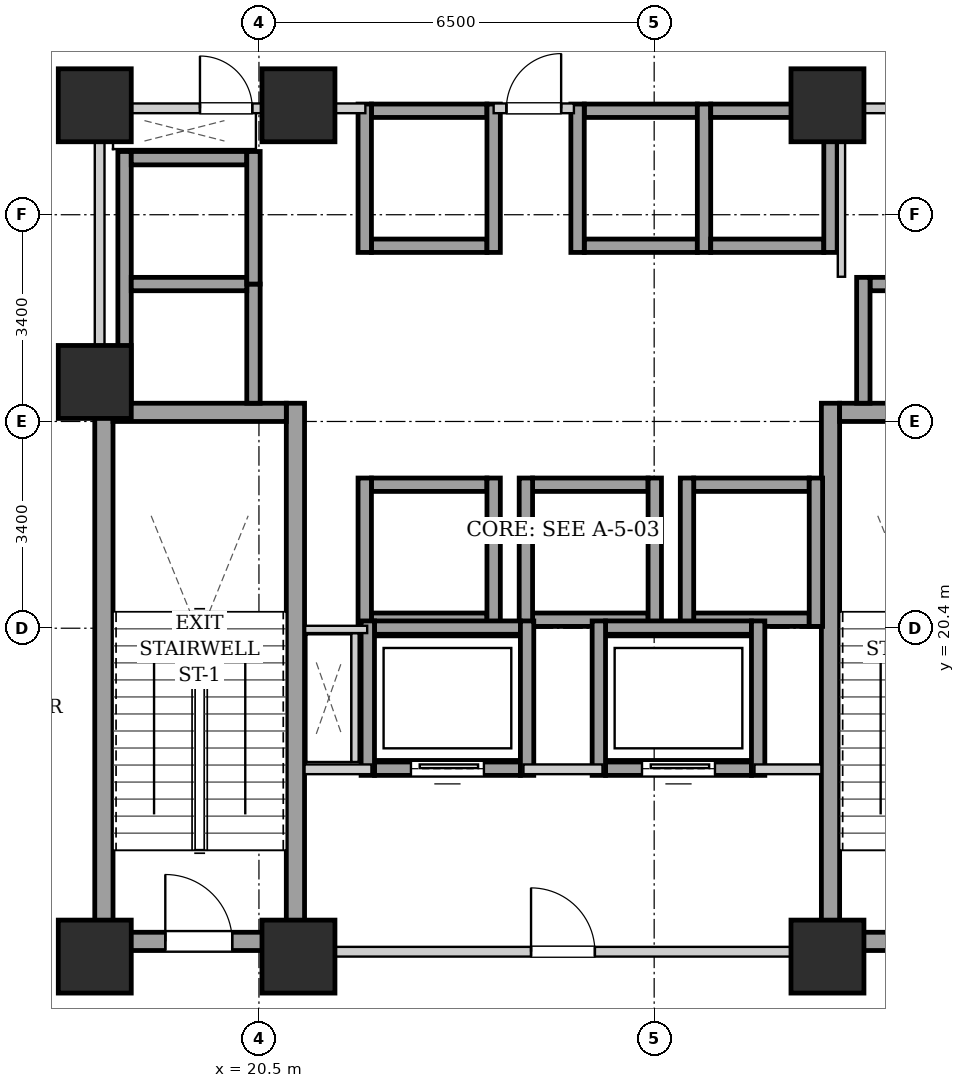
"""IFC4 building model, lengths in metres.
Left out: names, types, materials, properties, quantities, classifications, styles, units other than length and angle.
Written with IfcOpenShell. Run it as: python <this file> out.ifc"""

import sys

from ifc_helpers import new_model, si_unit, direction, frame, frame_2d, origin, origin_2d, place, context, subcontext, project, spatial, rectangle, extrude, element, fill, save


model = new_model("IFC4")
c1 = context("Model", 3, precision=1e-05, world=origin(), true_north=direction((0.0, 1.0)))
c2 = subcontext(c1, "Body", "Model", "MODEL_VIEW")
j1 = project(units=[si_unit("LENGTHUNIT", "METRE"), si_unit("PLANEANGLEUNIT", "RADIAN")], contexts=[c1])
p1 = place(None, origin())
s1 = spatial("IfcSite", under=j1, at=p1, CompositionType="ELEMENT")
p2 = place(p1, origin())
s2 = spatial("IfcBuilding", under=s1, at=p2, CompositionType="ELEMENT")
p3 = place(p2, frame((0.0, 0.0, 6.0)))
s3 = spatial("IfcBuildingStorey", under=s2, at=p3, CompositionType="ELEMENT", Elevation=6.0)
for number, where, z_axis, x_axis in (
    (1, (17.8, 15.0, 0.0), (0.0, 0.0, 1.0), (1.0, 0.0, 0.0)),
    (2, (21.15, 15.0, 0.0), (0.0, 0.0, 1.0), (1.0, 0.0, 0.0)),
    (3, (29.85, 15.0, 0.0), (0.0, 0.0, 1.0), (1.0, 0.0, 0.0)),
    (4, (17.8, 29.0, 0.0), (0.0, 0.0, 1.0), (1.0, 0.0, 0.0)),
    (5, (21.15, 29.0, 0.0), (0.0, 0.0, 1.0), (1.0, 0.0, 0.0)),
    (6, (29.85, 29.0, 0.0), (0.0, 0.0, 1.0), (1.0, 0.0, 0.0)),
    (7, (17.8, 24.45, 0.0), (0.0, 0.0, 1.0), (1.0, 0.0, 0.0)),
):
    element("IfcColumn", number, at=place(p3, frame(where, z_axis=z_axis, x_axis=x_axis)), inside=s3, PredefinedType="COLUMN", context=c2, shape_type="SweptSolid", body=[
        extrude(rectangle(XDim=1.2, YDim=1.2, at=origin_2d()), origin(), (0.0, 0.0, 1.0), 5.2),
    ])
for number, where, z_axis, x_axis in (
    (8, (17.95, 15.1, 0.0), (0.0, 0.0, 1.0), (0.0, 1.0, 0.0)),
    (9, (21.1, 15.1, 0.0), (0.0, 0.0, 1.0), (0.0, 1.0, 0.0)),
):
    element("IfcWall", number, at=place(p3, frame(where, z_axis=z_axis, x_axis=x_axis)), inside=s3, PredefinedType="SHEAR", context=c2, shape_type="SweptSolid", body=[
        extrude(rectangle(XDim=9.0, YDim=0.3, at=frame_2d((4.5, 0.0))), origin(), (0.0, 0.0, 1.0), 4.88),
    ])
p4 = place(p3, frame((18.1, 23.95, 0.0), z_axis=(0.0, 0.0, 1.0), x_axis=(1.0, 0.0, 0.0)))
e10 = element("IfcWall", 10, at=p4, inside=s3, PredefinedType="SHEAR", context=c2, shape_type="SweptSolid", body=[
    extrude(rectangle(XDim=2.85, YDim=0.3, at=frame_2d((1.425, 0.0))), origin(), (0.0, 0.0, 1.0), 4.88),
])
p5 = place(p3, frame((18.1, 15.25, 0.0), z_axis=(0.0, 0.0, 1.0), x_axis=(1.0, 0.0, 0.0)))
e11 = element("IfcWall", 11, at=p5, inside=s3, PredefinedType="SHEAR", context=c2, shape_type="SweptSolid", body=[
    extrude(rectangle(XDim=2.85, YDim=0.3, at=frame_2d((1.425, 0.0))), origin(), (0.0, 0.0, 1.0), 4.88),
])
p6 = place(p5, frame((0.86, 0.0, 0.0)))
e12 = element("IfcOpeningElement", 12, at=p6, cuts=e11, PredefinedType="OPENING", context=c2, shape_type="SweptSolid", body=[
    extrude(rectangle(XDim=1.1, YDim=2.05, at=frame_2d((0.55, 1.025))), frame((0.0, 0.16, 0.0), z_axis=(0.0, -1.0, 0.0), x_axis=(1.0, 0.0, 0.0)), (0.0, 0.0, 1.0), 0.32),
])
p7 = place(p3, frame((29.9, 15.1, 0.0), z_axis=(0.0, 0.0, 1.0), x_axis=(0.0, 1.0, 0.0)))
e13 = element("IfcWall", 13, at=p7, inside=s3, PredefinedType="SHEAR", context=c2, shape_type="SweptSolid", body=[
    extrude(rectangle(XDim=9.0, YDim=0.3, at=frame_2d((4.5, 0.0))), origin(), (0.0, 0.0, 1.0), 4.88),
])
p8 = place(p3, frame((30.05, 23.95, 0.0), z_axis=(0.0, 0.0, 1.0), x_axis=(1.0, 0.0, 0.0)))
e14 = element("IfcWall", 14, at=p8, inside=s3, PredefinedType="SHEAR", context=c2, shape_type="SweptSolid", body=[
    extrude(rectangle(XDim=2.85, YDim=0.3, at=frame_2d((1.425, 0.0))), origin(), (0.0, 0.0, 1.0), 4.88),
])
p9 = place(p3, frame((30.05, 15.25, 0.0), z_axis=(0.0, 0.0, 1.0), x_axis=(1.0, 0.0, 0.0)))
e15 = element("IfcWall", 15, at=p9, inside=s3, PredefinedType="SHEAR", context=c2, shape_type="SweptSolid", body=[
    extrude(rectangle(XDim=2.85, YDim=0.3, at=frame_2d((1.425, 0.0))), origin(), (0.0, 0.0, 1.0), 4.88),
])
p10 = place(p9, frame((0.86, 0.0, 0.0)))
e16 = element("IfcOpeningElement", 16, at=p10, cuts=e15, PredefinedType="OPENING", context=c2, shape_type="SweptSolid", body=[
    extrude(rectangle(XDim=1.1, YDim=2.05, at=frame_2d((0.55, 1.025))), frame((0.0, 0.16, 0.0), z_axis=(0.0, -1.0, 0.0), x_axis=(1.0, 0.0, 0.0)), (0.0, 0.0, 1.0), 0.32),
])
for number, where, z_axis, x_axis in (
    (17, (22.35, 26.69, 0.0), (0.0, 0.0, 1.0), (1.0, 0.0, 0.0)),
    (18, (22.35, 28.91, 0.0), (0.0, 0.0, 1.0), (1.0, 0.0, 0.0)),
):
    element("IfcWall", number, at=place(p3, frame(where, z_axis=z_axis, x_axis=x_axis)), inside=s3, PredefinedType="SHEAR", context=c2, shape_type="SweptSolid", body=[
        extrude(rectangle(XDim=1.9, YDim=0.22, at=frame_2d((0.95, 0.0))), origin(), (0.0, 0.0, 1.0), 4.88),
    ])
for number, where, z_axis, x_axis in (
    (19, (22.24, 26.58, 0.0), (0.0, 0.0, 1.0), (0.0, 1.0, 0.0)),
    (20, (24.36, 26.58, 0.0), (0.0, 0.0, 1.0), (0.0, 1.0, 0.0)),
):
    element("IfcWall", number, at=place(p3, frame(where, z_axis=z_axis, x_axis=x_axis)), inside=s3, PredefinedType="SHEAR", context=c2, shape_type="SweptSolid", body=[
        extrude(rectangle(XDim=2.44, YDim=0.22, at=frame_2d((1.22, 0.0))), origin(), (0.0, 0.0, 1.0), 4.88),
    ])
for number, where, z_axis, x_axis in (
    (21, (25.85, 26.69, 0.0), (0.0, 0.0, 1.0), (1.0, 0.0, 0.0)),
    (22, (25.85, 28.91, 0.0), (0.0, 0.0, 1.0), (1.0, 0.0, 0.0)),
):
    element("IfcWall", number, at=place(p3, frame(where, z_axis=z_axis, x_axis=x_axis)), inside=s3, PredefinedType="SHEAR", context=c2, shape_type="SweptSolid", body=[
        extrude(rectangle(XDim=1.86, YDim=0.22, at=frame_2d((0.93, 0.0))), origin(), (0.0, 0.0, 1.0), 4.88),
    ])
for number, where, z_axis, x_axis in (
    (23, (25.74, 26.58, 0.0), (0.0, 0.0, 1.0), (0.0, 1.0, 0.0)),
    (24, (27.82, 26.58, 0.0), (0.0, 0.0, 1.0), (0.0, 1.0, 0.0)),
):
    element("IfcWall", number, at=place(p3, frame(where, z_axis=z_axis, x_axis=x_axis)), inside=s3, PredefinedType="SHEAR", context=c2, shape_type="SweptSolid", body=[
        extrude(rectangle(XDim=2.44, YDim=0.22, at=frame_2d((1.22, 0.0))), origin(), (0.0, 0.0, 1.0), 4.88),
    ])
for number, where, z_axis, x_axis in (
    (25, (27.93, 26.69, 0.0), (0.0, 0.0, 1.0), (1.0, 0.0, 0.0)),
    (26, (27.93, 28.91, 0.0), (0.0, 0.0, 1.0), (1.0, 0.0, 0.0)),
):
    element("IfcWall", number, at=place(p3, frame(where, z_axis=z_axis, x_axis=x_axis)), inside=s3, PredefinedType="SHEAR", context=c2, shape_type="SweptSolid", body=[
        extrude(rectangle(XDim=1.86, YDim=0.22, at=frame_2d((0.93, 0.0))), origin(), (0.0, 0.0, 1.0), 4.88),
    ])
p11 = place(p3, frame((29.9, 26.58, 0.0), z_axis=(0.0, 0.0, 1.0), x_axis=(0.0, 1.0, 0.0)))
e27 = element("IfcWall", 27, at=p11, inside=s3, PredefinedType="SHEAR", context=c2, shape_type="SweptSolid", body=[
    extrude(rectangle(XDim=2.44, YDim=0.22, at=frame_2d((1.22, 0.0))), origin(), (0.0, 0.0, 1.0), 4.88),
])
for number, where, z_axis, x_axis in (
    (28, (22.35, 20.54, 0.0), (0.0, 0.0, 1.0), (1.0, 0.0, 0.0)),
    (29, (22.35, 22.76, 0.0), (0.0, 0.0, 1.0), (1.0, 0.0, 0.0)),
):
    element("IfcWall", number, at=place(p3, frame(where, z_axis=z_axis, x_axis=x_axis)), inside=s3, PredefinedType="SHEAR", context=c2, shape_type="SweptSolid", body=[
        extrude(rectangle(XDim=1.9, YDim=0.22, at=frame_2d((0.95, 0.0))), origin(), (0.0, 0.0, 1.0), 4.88),
    ])
for number, where, z_axis, x_axis in (
    (30, (22.24, 20.43, 0.0), (0.0, 0.0, 1.0), (0.0, 1.0, 0.0)),
    (31, (24.36, 20.43, 0.0), (0.0, 0.0, 1.0), (0.0, 1.0, 0.0)),
):
    element("IfcWall", number, at=place(p3, frame(where, z_axis=z_axis, x_axis=x_axis)), inside=s3, PredefinedType="SHEAR", context=c2, shape_type="SweptSolid", body=[
        extrude(rectangle(XDim=2.44, YDim=0.22, at=frame_2d((1.22, 0.0))), origin(), (0.0, 0.0, 1.0), 4.88),
    ])
for number, where, z_axis, x_axis in (
    (32, (25.0, 20.54, 0.0), (0.0, 0.0, 1.0), (1.0, 0.0, 0.0)),
    (33, (25.0, 22.76, 0.0), (0.0, 0.0, 1.0), (1.0, 0.0, 0.0)),
):
    element("IfcWall", number, at=place(p3, frame(where, z_axis=z_axis, x_axis=x_axis)), inside=s3, PredefinedType="SHEAR", context=c2, shape_type="SweptSolid", body=[
        extrude(rectangle(XDim=1.9, YDim=0.22, at=frame_2d((0.95, 0.0))), origin(), (0.0, 0.0, 1.0), 4.88),
    ])
for number, where, z_axis, x_axis in (
    (34, (24.89, 20.43, 0.0), (0.0, 0.0, 1.0), (0.0, 1.0, 0.0)),
    (35, (27.01, 20.43, 0.0), (0.0, 0.0, 1.0), (0.0, 1.0, 0.0)),
):
    element("IfcWall", number, at=place(p3, frame(where, z_axis=z_axis, x_axis=x_axis)), inside=s3, PredefinedType="SHEAR", context=c2, shape_type="SweptSolid", body=[
        extrude(rectangle(XDim=2.44, YDim=0.22, at=frame_2d((1.22, 0.0))), origin(), (0.0, 0.0, 1.0), 4.88),
    ])
for number, where, z_axis, x_axis in (
    (36, (27.65, 20.54, 0.0), (0.0, 0.0, 1.0), (1.0, 0.0, 0.0)),
    (37, (27.65, 22.76, 0.0), (0.0, 0.0, 1.0), (1.0, 0.0, 0.0)),
):
    element("IfcWall", number, at=place(p3, frame(where, z_axis=z_axis, x_axis=x_axis)), inside=s3, PredefinedType="SHEAR", context=c2, shape_type="SweptSolid", body=[
        extrude(rectangle(XDim=1.9, YDim=0.22, at=frame_2d((0.95, 0.0))), origin(), (0.0, 0.0, 1.0), 4.88),
    ])
for number, where, z_axis, x_axis in (
    (38, (27.54, 20.43, 0.0), (0.0, 0.0, 1.0), (0.0, 1.0, 0.0)),
    (39, (29.66, 20.43, 0.0), (0.0, 0.0, 1.0), (0.0, 1.0, 0.0)),
):
    element("IfcWall", number, at=place(p3, frame(where, z_axis=z_axis, x_axis=x_axis)), inside=s3, PredefinedType="SHEAR", context=c2, shape_type="SweptSolid", body=[
        extrude(rectangle(XDim=2.44, YDim=0.22, at=frame_2d((1.22, 0.0))), origin(), (0.0, 0.0, 1.0), 4.88),
    ])
p12 = place(p3, frame((18.29, 24.1, 0.0), z_axis=(0.0, 0.0, 1.0), x_axis=(0.0, 1.0, 0.0)))
e40 = element("IfcWall", 40, at=p12, inside=s3, PredefinedType="SHEAR", context=c2, shape_type="SweptSolid", body=[
    extrude(rectangle(XDim=4.14, YDim=0.22, at=frame_2d((2.07, 0.0))), origin(), (0.0, 0.0, 1.0), 4.88),
])
p13 = place(p3, frame((20.41, 24.1, 0.0), z_axis=(0.0, 0.0, 1.0), x_axis=(0.0, 1.0, 0.0)))
e41 = element("IfcWall", 41, at=p13, inside=s3, PredefinedType="SHEAR", context=c2, shape_type="SweptSolid", body=[
    extrude(rectangle(XDim=1.96, YDim=0.22, at=frame_2d((0.98, 0.0))), origin(), (0.0, 0.0, 1.0), 4.88),
])
for number, where, z_axis, x_axis in (
    (42, (18.4, 26.06, 0.0), (0.0, 0.0, 1.0), (1.0, 0.0, 0.0)),
    (43, (18.4, 28.13, 0.0), (0.0, 0.0, 1.0), (1.0, 0.0, 0.0)),
):
    element("IfcWall", number, at=place(p3, frame(where, z_axis=z_axis, x_axis=x_axis)), inside=s3, PredefinedType="SHEAR", context=c2, shape_type="SweptSolid", body=[
        extrude(rectangle(XDim=1.9, YDim=0.22, at=frame_2d((0.95, 0.0))), origin(), (0.0, 0.0, 1.0), 4.88),
    ])
p14 = place(p3, frame((20.41, 26.06, 0.0), z_axis=(0.0, 0.0, 1.0), x_axis=(0.0, 1.0, 0.0)))
e44 = element("IfcWall", 44, at=p14, inside=s3, PredefinedType="SHEAR", context=c2, shape_type="SweptSolid", body=[
    extrude(rectangle(XDim=2.18, YDim=0.22, at=frame_2d((1.09, 0.0))), origin(), (0.0, 0.0, 1.0), 4.88),
])
p15 = place(p3, frame((30.55, 26.06, 0.0), z_axis=(0.0, 0.0, 1.0), x_axis=(1.0, 0.0, 0.0)))
e45 = element("IfcWall", 45, at=p15, inside=s3, PredefinedType="SHEAR", context=c2, shape_type="SweptSolid", body=[
    extrude(rectangle(XDim=1.9, YDim=0.22, at=frame_2d((0.95, 0.0))), origin(), (0.0, 0.0, 1.0), 4.88),
])
p16 = place(p3, frame((30.44, 24.1, 0.0), z_axis=(0.0, 0.0, 1.0), x_axis=(0.0, 1.0, 0.0)))
e46 = element("IfcWall", 46, at=p16, inside=s3, PredefinedType="SHEAR", context=c2, shape_type="SweptSolid", body=[
    extrude(rectangle(XDim=2.07, YDim=0.22, at=frame_2d((1.035, 0.0))), origin(), (0.0, 0.0, 1.0), 4.88),
])
p17 = place(p3, frame((22.4, 18.09, 0.0), z_axis=(0.0, 0.0, 1.0), x_axis=(1.0, 0.0, 0.0)))
e47 = element("IfcWall", 47, at=p17, inside=s3, PredefinedType="SHEAR", context=c2, shape_type="SweptSolid", body=[
    extrude(rectangle(XDim=2.4, YDim=0.22, at=frame_2d((1.2, 0.0))), origin(), (0.0, 0.0, 1.0), 4.88),
])
p18 = place(p17, frame((0.6, 0.0, 0.0)))
e48 = element("IfcOpeningElement", 48, at=p18, cuts=e47, PredefinedType="OPENING", context=c2, shape_type="SweptSolid", body=[
    extrude(rectangle(XDim=1.2, YDim=2.15, at=frame_2d((0.6, 1.075))), frame((0.0, 0.12, 0.0), z_axis=(0.0, -1.0, 0.0), x_axis=(1.0, 0.0, 0.0)), (0.0, 0.0, 1.0), 0.24),
])
p19 = place(p3, frame((22.4, 20.41, 0.0), z_axis=(0.0, 0.0, 1.0), x_axis=(1.0, 0.0, 0.0)))
e49 = element("IfcWall", 49, at=p19, inside=s3, PredefinedType="SHEAR", context=c2, shape_type="SweptSolid", body=[
    extrude(rectangle(XDim=2.4, YDim=0.22, at=frame_2d((1.2, 0.0))), origin(), (0.0, 0.0, 1.0), 4.88),
])
for number, where, z_axis, x_axis in (
    (50, (22.29, 17.98, 0.0), (0.0, 0.0, 1.0), (0.0, 1.0, 0.0)),
    (51, (24.91, 17.98, 0.0), (0.0, 0.0, 1.0), (0.0, 1.0, 0.0)),
):
    element("IfcWall", number, at=place(p3, frame(where, z_axis=z_axis, x_axis=x_axis)), inside=s3, PredefinedType="SHEAR", context=c2, shape_type="SweptSolid", body=[
        extrude(rectangle(XDim=2.54, YDim=0.22, at=frame_2d((1.27, 0.0))), origin(), (0.0, 0.0, 1.0), 4.88),
    ])
p20 = place(p3, frame((26.2, 18.09, 0.0), z_axis=(0.0, 0.0, 1.0), x_axis=(1.0, 0.0, 0.0)))
e52 = element("IfcWall", 52, at=p20, inside=s3, PredefinedType="SHEAR", context=c2, shape_type="SweptSolid", body=[
    extrude(rectangle(XDim=2.4, YDim=0.22, at=frame_2d((1.2, 0.0))), origin(), (0.0, 0.0, 1.0), 4.88),
])
p21 = place(p20, frame((0.6, 0.0, 0.0)))
e53 = element("IfcOpeningElement", 53, at=p21, cuts=e52, PredefinedType="OPENING", context=c2, shape_type="SweptSolid", body=[
    extrude(rectangle(XDim=1.2, YDim=2.15, at=frame_2d((0.6, 1.075))), frame((0.0, 0.12, 0.0), z_axis=(0.0, -1.0, 0.0), x_axis=(1.0, 0.0, 0.0)), (0.0, 0.0, 1.0), 0.24),
])
p22 = place(p3, frame((26.2, 20.41, 0.0), z_axis=(0.0, 0.0, 1.0), x_axis=(1.0, 0.0, 0.0)))
e54 = element("IfcWall", 54, at=p22, inside=s3, PredefinedType="SHEAR", context=c2, shape_type="SweptSolid", body=[
    extrude(rectangle(XDim=2.4, YDim=0.22, at=frame_2d((1.2, 0.0))), origin(), (0.0, 0.0, 1.0), 4.88),
])
for number, where, z_axis, x_axis in (
    (55, (26.09, 17.98, 0.0), (0.0, 0.0, 1.0), (0.0, 1.0, 0.0)),
    (56, (28.71, 17.98, 0.0), (0.0, 0.0, 1.0), (0.0, 1.0, 0.0)),
):
    element("IfcWall", number, at=place(p3, frame(where, z_axis=z_axis, x_axis=x_axis)), inside=s3, PredefinedType="SHEAR", context=c2, shape_type="SweptSolid", body=[
        extrude(rectangle(XDim=2.54, YDim=0.22, at=frame_2d((1.27, 0.0))), origin(), (0.0, 0.0, 1.0), 4.88),
    ])
p23 = place(p3, frame((21.25, 15.08, 0.0), z_axis=(0.0, 0.0, 1.0), x_axis=(1.0, 0.0, 0.0)))
e57 = element("IfcWall", 57, at=p23, inside=s3, PredefinedType="PARTITIONING", context=c2, shape_type="SweptSolid", body=[
    extrude(rectangle(XDim=8.5, YDim=0.16, at=frame_2d((4.25, 0.0))), origin(), (0.0, 0.0, 1.0), 4.88),
])
p24 = place(p23, frame((3.725, 0.0, 0.0)))
e58 = element("IfcOpeningElement", 58, at=p24, cuts=e57, PredefinedType="OPENING", context=c2, shape_type="SweptSolid", body=[
    extrude(rectangle(XDim=1.05, YDim=2.05, at=frame_2d((0.525, 1.025))), frame((0.0, 0.09, 0.0), z_axis=(0.0, -1.0, 0.0), x_axis=(1.0, 0.0, 0.0)), (0.0, 0.0, 1.0), 0.18),
])
p25 = place(p3, frame((21.25, 18.08, 0.0), z_axis=(0.0, 0.0, 1.0), x_axis=(1.0, 0.0, 0.0)))
e59 = element("IfcWall", 59, at=p25, inside=s3, PredefinedType="PARTITIONING", context=c2, shape_type="SweptSolid", body=[
    extrude(rectangle(XDim=1.1, YDim=0.16, at=frame_2d((0.55, 0.0))), origin(), (0.0, 0.0, 1.0), 4.88),
])
p26 = place(p3, frame((24.85, 18.08, 0.0), z_axis=(0.0, 0.0, 1.0), x_axis=(1.0, 0.0, 0.0)))
e60 = element("IfcWall", 60, at=p26, inside=s3, PredefinedType="PARTITIONING", context=c2, shape_type="SweptSolid", body=[
    extrude(rectangle(XDim=1.3, YDim=0.16, at=frame_2d((0.65, 0.0))), origin(), (0.0, 0.0, 1.0), 4.88),
])
p27 = place(p3, frame((28.65, 18.08, 0.0), z_axis=(0.0, 0.0, 1.0), x_axis=(1.0, 0.0, 0.0)))
e61 = element("IfcWall", 61, at=p27, inside=s3, PredefinedType="PARTITIONING", context=c2, shape_type="SweptSolid", body=[
    extrude(rectangle(XDim=1.1, YDim=0.16, at=frame_2d((0.55, 0.0))), origin(), (0.0, 0.0, 1.0), 4.88),
])
p28 = place(p3, frame((17.88, 24.12, 0.0), z_axis=(0.0, 0.0, 1.0), x_axis=(0.0, 1.0, 0.0)))
e62 = element("IfcWall", 62, at=p28, inside=s3, PredefinedType="PARTITIONING", context=c2, shape_type="SweptSolid", body=[
    extrude(rectangle(XDim=4.76, YDim=0.16, at=frame_2d((2.38, 0.0))), origin(), (0.0, 0.0, 1.0), 4.88),
])
p29 = place(p3, frame((24.36, 28.95, 0.0), z_axis=(0.0, 0.0, 1.0), x_axis=(1.0, 0.0, 0.0)))
e63 = element("IfcWall", 63, at=p29, inside=s3, PredefinedType="PARTITIONING", context=c2, shape_type="SweptSolid", body=[
    extrude(rectangle(XDim=1.32, YDim=0.16, at=frame_2d((0.66, 0.0))), origin(), (0.0, 0.0, 1.0), 4.88),
])
p30 = place(p29, frame((0.21, 0.0, 0.0)))
e64 = element("IfcOpeningElement", 64, at=p30, cuts=e63, PredefinedType="OPENING", context=c2, shape_type="SweptSolid", body=[
    extrude(rectangle(XDim=0.9, YDim=2.05, at=frame_2d((0.45, 1.025))), frame((0.0, 0.09, 0.0), z_axis=(0.0, -1.0, 0.0), x_axis=(1.0, 0.0, 0.0)), (0.0, 0.0, 1.0), 0.18),
])
p31 = place(p3, frame((17.96, 28.95, 0.0), z_axis=(0.0, 0.0, 1.0), x_axis=(1.0, 0.0, 0.0)))
e65 = element("IfcWall", 65, at=p31, inside=s3, PredefinedType="PARTITIONING", context=c2, shape_type="SweptSolid", body=[
    extrude(rectangle(XDim=4.29, YDim=0.16, at=frame_2d((2.145, 0.0))), origin(), (0.0, 0.0, 1.0), 4.88),
])
p32 = place(p31, frame((1.57, 0.0, 0.0)))
e66 = element("IfcOpeningElement", 66, at=p32, cuts=e65, PredefinedType="OPENING", context=c2, shape_type="SweptSolid", body=[
    extrude(rectangle(XDim=0.86, YDim=2.05, at=frame_2d((0.43, 1.025))), frame((0.0, 0.09, 0.0), z_axis=(0.0, -1.0, 0.0), x_axis=(1.0, 0.0, 0.0)), (0.0, 0.0, 1.0), 0.18),
])
p33 = place(p3, frame((22.08, 18.2, 0.0), z_axis=(0.0, 0.0, 1.0), x_axis=(0.0, 1.0, 0.0)))
e67 = element("IfcWall", 67, at=p33, inside=s3, PredefinedType="PARTITIONING", context=c2, shape_type="SweptSolid", body=[
    extrude(rectangle(XDim=2.12, YDim=0.12, at=frame_2d((1.06, 0.0))), origin(), (0.0, 0.0, 1.0), 4.88),
])
p34 = place(p3, frame((22.28, 20.38, 0.0), z_axis=(0.0, 0.0, 1.0), x_axis=(-1.0, 0.0, 0.0)))
e68 = element("IfcWall", 68, at=p34, inside=s3, PredefinedType="PARTITIONING", context=c2, shape_type="SweptSolid", body=[
    extrude(rectangle(XDim=1.02, YDim=0.12, at=frame_2d((0.51, 0.0))), origin(), (0.0, 0.0, 1.0), 4.88),
])
p35 = place(p3, frame((30.08, 26.18, 0.0), z_axis=(0.0, 0.0, 1.0), x_axis=(0.0, 1.0, 0.0)))
e69 = element("IfcWall", 69, at=p35, inside=s3, PredefinedType="PARTITIONING", context=c2, shape_type="SweptSolid", body=[
    extrude(rectangle(XDim=2.68, YDim=0.12, at=frame_2d((1.34, 0.0))), origin(), (0.0, 0.0, 1.0), 4.88),
])
p36 = place(p3, frame((30.08, 28.95, 0.0), z_axis=(0.0, 0.0, 1.0), x_axis=(1.0, 0.0, 0.0)))
e70 = element("IfcWall", 70, at=p36, inside=s3, PredefinedType="PARTITIONING", context=c2, shape_type="SweptSolid", body=[
    extrude(rectangle(XDim=2.96, YDim=0.16, at=frame_2d((1.48, 0.0))), origin(), (0.0, 0.0, 1.0), 4.88),
])
p37 = place(p36, frame((1.045, 0.0, 0.0)))
e71 = element("IfcOpeningElement", 71, at=p37, cuts=e70, PredefinedType="OPENING", context=c2, shape_type="SweptSolid", body=[
    extrude(rectangle(XDim=0.86, YDim=2.05, at=frame_2d((0.43, 1.025))), frame((0.0, 0.09, 0.0), z_axis=(0.0, -1.0, 0.0), x_axis=(1.0, 0.0, 0.0)), (0.0, 0.0, 1.0), 0.18),
])
p38 = place(p6, origin())
e72 = element("IfcDoor", 72, at=p38, inside=s3, OperationType="SINGLE_SWING_LEFT", PredefinedType="DOOR", context=c2, shape_type="SweptSolid", body=[
    extrude(rectangle(XDim=1.1, YDim=2.05, at=frame_2d((0.55, 1.025))), frame((0.0, 0.025, 0.0), z_axis=(0.0, -1.0, 0.0), x_axis=(1.0, 0.0, 0.0)), (0.0, 0.0, 1.0), 0.05),
])
fill(e12, e72)
p39 = place(p18, origin())
e73 = element("IfcDoor", 73, at=p39, inside=s3, OperationType="SLIDING_TO_LEFT", PredefinedType="DOOR", context=c2, shape_type="SweptSolid", body=[
    extrude(rectangle(XDim=1.2, YDim=2.15, at=frame_2d((0.6, 1.075))), frame((0.0, 0.025, 0.0), z_axis=(0.0, -1.0, 0.0), x_axis=(1.0, 0.0, 0.0)), (0.0, 0.0, 1.0), 0.05),
])
fill(e48, e73)
p40 = place(p21, origin())
e74 = element("IfcDoor", 74, at=p40, inside=s3, OperationType="SLIDING_TO_LEFT", PredefinedType="DOOR", context=c2, shape_type="SweptSolid", body=[
    extrude(rectangle(XDim=1.2, YDim=2.15, at=frame_2d((0.6, 1.075))), frame((0.0, 0.025, 0.0), z_axis=(0.0, -1.0, 0.0), x_axis=(1.0, 0.0, 0.0)), (0.0, 0.0, 1.0), 0.05),
])
fill(e53, e74)
p41 = place(p24, origin())
e75 = element("IfcDoor", 75, at=p41, inside=s3, OperationType="SINGLE_SWING_LEFT", PredefinedType="DOOR", context=c2, shape_type="SweptSolid", body=[
    extrude(rectangle(XDim=1.05, YDim=2.05, at=frame_2d((0.525, 1.025))), frame((0.0, 0.025, 0.0), z_axis=(0.0, -1.0, 0.0), x_axis=(1.0, 0.0, 0.0)), (0.0, 0.0, 1.0), 0.05),
])
fill(e58, e75)
p42 = place(p30, origin())
e76 = element("IfcDoor", 76, at=p42, inside=s3, OperationType="SINGLE_SWING_RIGHT", PredefinedType="DOOR", context=c2, shape_type="SweptSolid", body=[
    extrude(rectangle(XDim=0.9, YDim=2.05, at=frame_2d((0.45, 1.025))), frame((0.0, 0.025, 0.0), z_axis=(0.0, -1.0, 0.0), x_axis=(1.0, 0.0, 0.0)), (0.0, 0.0, 1.0), 0.05),
])
fill(e64, e76)
p43 = place(p32, origin())
e77 = element("IfcDoor", 77, at=p43, inside=s3, OperationType="SINGLE_SWING_LEFT", PredefinedType="DOOR", context=c2, shape_type="SweptSolid", body=[
    extrude(rectangle(XDim=0.86, YDim=2.05, at=frame_2d((0.43, 1.025))), frame((0.0, 0.025, 0.0), z_axis=(0.0, -1.0, 0.0), x_axis=(1.0, 0.0, 0.0)), (0.0, 0.0, 1.0), 0.05),
])
fill(e66, e77)
save(model, sys.argv[1])
